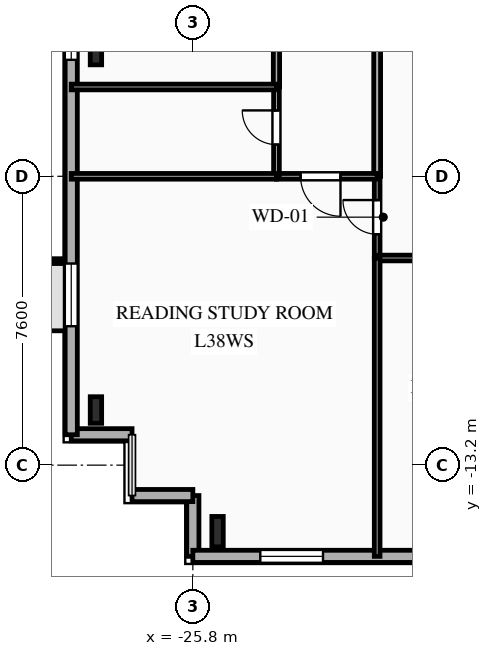
"""IFC4 building model, lengths in metres.
Left out: names, types, materials, properties, quantities, classifications, styles, units other than length and angle.
Written with IfcOpenShell. Run it as: python <this file> out.ifc"""

import sys

from ifc_helpers import new_model, si_unit, direction, frame, frame_2d, origin, origin_2d, place, context, subcontext, project, spatial, rectangle, i_section, extrude, element, fill, save


model = new_model("IFC4")
c1 = context("Model", 3, precision=1e-05, world=origin(), true_north=direction((0.0, 1.0)))
c2 = subcontext(c1, "Body", "Model", "MODEL_VIEW")
j1 = project(units=[si_unit("LENGTHUNIT", "METRE"), si_unit("PLANEANGLEUNIT", "RADIAN")], contexts=[c1])
p1 = place(None, origin())
s1 = spatial("IfcSite", under=j1, at=p1, CompositionType="ELEMENT")
p2 = place(p1, origin())
s2 = spatial("IfcBuilding", under=s1, at=p2, CompositionType="ELEMENT")
p3 = place(p2, frame((0.0, 0.0, 137.7)))
s3 = spatial("IfcBuildingStorey", under=s2, at=p3, CompositionType="ELEMENT", Elevation=137.7)
p4 = place(p3, frame((-25.15, -14.95, 0.0), z_axis=(0.0, 0.0, 1.0), x_axis=(1.0, 0.0, 0.0)))
e1 = element("IfcColumn", 1, at=p4, inside=s3, PredefinedType="COLUMN", context=c2, shape_type="SweptSolid", body=[
    extrude(i_section(OverallWidth=0.3, OverallDepth=0.8, WebThickness=0.018, FlangeThickness=0.033, FilletRadius=0.03, at=origin_2d()), origin(), (0.0, 0.0, 1.0), 3.35),
])
for number, where, z_axis, x_axis in (
    (2, (-28.35, -2.317, 0.0), (0.0, 0.0, 1.0), (1.0, 0.0, 0.0)),
    (3, (-28.35, -11.75, 0.0), (0.0, 0.0, 1.0), (1.0, 0.0, 0.0)),
):
    element("IfcColumn", number, at=place(p3, frame(where, z_axis=z_axis, x_axis=x_axis)), inside=s3, PredefinedType="COLUMN", context=c2, shape_type="SweptSolid", body=[
        extrude(i_section(OverallWidth=0.3, OverallDepth=0.7, WebThickness=0.017, FlangeThickness=0.032, FilletRadius=0.027, at=origin_2d()), origin(), (0.0, 0.0, 1.0), 3.35),
    ])
p5 = place(p3, frame((-25.8, -15.6, 0.0), z_axis=(0.0, 0.0, 1.0), x_axis=(0.0, 1.0, 0.0)))
e4 = element("IfcWall", 4, at=p5, inside=s3, PredefinedType="SOLIDWALL", context=c2, shape_type="SweptSolid", body=[
    extrude(rectangle(XDim=1.6, YDim=0.32, at=frame_2d((0.8, 0.0))), origin(), (0.0, 0.0, 1.0), 3.04),
])
p6 = place(p3, frame((-25.8, -14.0, 0.0), z_axis=(0.0, 0.0, 1.0), x_axis=(-1.0, 0.0, 0.0)))
e5 = element("IfcWall", 5, at=p6, inside=s3, PredefinedType="SOLIDWALL", context=c2, shape_type="SweptSolid", body=[
    extrude(rectangle(XDim=1.6, YDim=0.32, at=frame_2d((0.8, 0.0))), origin(), (0.0, 0.0, 1.0), 3.04),
])
p7 = place(p3, frame((-27.4, -12.4, 0.0), z_axis=(0.0, 0.0, 1.0), x_axis=(-1.0, 0.0, 0.0)))
e6 = element("IfcWall", 6, at=p7, inside=s3, PredefinedType="SOLIDWALL", context=c2, shape_type="SweptSolid", body=[
    extrude(rectangle(XDim=1.6, YDim=0.32, at=frame_2d((0.8, 0.0))), origin(), (0.0, 0.0, 1.0), 3.04),
])
p8 = place(p3, frame((-29.0, -12.4, 0.0), z_axis=(0.0, 0.0, 1.0), x_axis=(0.0, 1.0, 0.0)))
e7 = element("IfcWall", 7, at=p8, inside=s3, PredefinedType="SOLIDWALL", context=c2, shape_type="SweptSolid", body=[
    extrude(rectangle(XDim=29.6, YDim=0.32, at=frame_2d((14.8, 0.0))), origin(), (0.0, 0.0, 1.0), 3.04),
])
p9 = place(p8, frame((2.855, 0.0, 0.85)))
e8 = element("IfcOpeningElement", 8, at=p9, cuts=e7, PredefinedType="OPENING", context=c2, shape_type="SweptSolid", body=[
    extrude(rectangle(XDim=1.65, YDim=1.85, at=frame_2d((0.825, 0.925))), frame((0.0, 0.17, 0.0), z_axis=(0.0, -1.0, 0.0), x_axis=(1.0, 0.0, 0.0)), (0.0, 0.0, 1.0), 0.34),
])
p10 = place(p8, frame((9.865, 0.0, 0.85)))
e9 = element("IfcOpeningElement", 9, at=p10, cuts=e7, PredefinedType="OPENING", context=c2, shape_type="SweptSolid", body=[
    extrude(rectangle(XDim=1.95, YDim=1.85, at=frame_2d((0.975, 0.925))), frame((0.0, 0.17, 0.0), z_axis=(0.0, -1.0, 0.0), x_axis=(1.0, 0.0, 0.0)), (0.0, 0.0, 1.0), 0.34),
])
p11 = place(p8, frame((13.13, 0.0, 0.85)))
e10 = element("IfcOpeningElement", 10, at=p11, cuts=e7, PredefinedType="OPENING", context=c2, shape_type="SweptSolid", body=[
    extrude(rectangle(XDim=1.5, YDim=1.85, at=frame_2d((0.75, 0.925))), frame((0.0, 0.17, 0.0), z_axis=(0.0, -1.0, 0.0), x_axis=(1.0, 0.0, 0.0)), (0.0, 0.0, 1.0), 0.34),
])
p12 = place(p8, frame((15.93, 0.0, 0.85)))
e11 = element("IfcOpeningElement", 11, at=p12, cuts=e7, PredefinedType="OPENING", context=c2, shape_type="SweptSolid", body=[
    extrude(rectangle(XDim=1.5, YDim=1.85, at=frame_2d((0.75, 0.925))), frame((0.0, 0.17, 0.0), z_axis=(0.0, -1.0, 0.0), x_axis=(1.0, 0.0, 0.0)), (0.0, 0.0, 1.0), 0.34),
])
p13 = place(p8, frame((18.77, 0.0, 0.85)))
e12 = element("IfcOpeningElement", 12, at=p13, cuts=e7, PredefinedType="OPENING", context=c2, shape_type="SweptSolid", body=[
    extrude(rectangle(XDim=1.5, YDim=1.85, at=frame_2d((0.75, 0.925))), frame((0.0, 0.17, 0.0), z_axis=(0.0, -1.0, 0.0), x_axis=(1.0, 0.0, 0.0)), (0.0, 0.0, 1.0), 0.34),
])
p14 = place(p8, frame((24.255, 0.0, 0.85)))
e13 = element("IfcOpeningElement", 13, at=p14, cuts=e7, PredefinedType="OPENING", context=c2, shape_type="SweptSolid", body=[
    extrude(rectangle(XDim=1.65, YDim=1.85, at=frame_2d((0.825, 0.925))), frame((0.0, 0.17, 0.0), z_axis=(0.0, -1.0, 0.0), x_axis=(1.0, 0.0, 0.0)), (0.0, 0.0, 1.0), 0.34),
])
p15 = place(p3, frame((23.8, -15.6, 0.0), z_axis=(0.0, 0.0, 1.0), x_axis=(-1.0, 0.0, 0.0)))
e14 = element("IfcWall", 14, at=p15, inside=s3, PredefinedType="SOLIDWALL", context=c2, shape_type="SweptSolid", body=[
    extrude(rectangle(XDim=49.6, YDim=0.32, at=frame_2d((24.8, 0.0))), origin(), (0.0, 0.0, 1.0), 3.04),
])
p16 = place(p15, frame((1.13, 0.0, 0.85)))
e15 = element("IfcOpeningElement", 15, at=p16, cuts=e14, PredefinedType="OPENING", context=c2, shape_type="SweptSolid", body=[
    extrude(rectangle(XDim=1.1, YDim=1.85, at=frame_2d((0.55, 0.925))), frame((0.0, 0.17, 0.0), z_axis=(0.0, -1.0, 0.0), x_axis=(1.0, 0.0, 0.0)), (0.0, 0.0, 1.0), 0.34),
])
p17 = place(p15, frame((6.495, 0.0, 0.85)))
e16 = element("IfcOpeningElement", 16, at=p17, cuts=e14, PredefinedType="OPENING", context=c2, shape_type="SweptSolid", body=[
    extrude(rectangle(XDim=1.65, YDim=1.85, at=frame_2d((0.825, 0.925))), frame((0.0, 0.17, 0.0), z_axis=(0.0, -1.0, 0.0), x_axis=(1.0, 0.0, 0.0)), (0.0, 0.0, 1.0), 0.34),
])
p18 = place(p15, frame((13.996, 0.0, 0.85)))
e17 = element("IfcOpeningElement", 17, at=p18, cuts=e14, PredefinedType="OPENING", context=c2, shape_type="SweptSolid", body=[
    extrude(rectangle(XDim=2.2, YDim=1.85, at=frame_2d((1.1, 0.925))), frame((0.0, 0.17, 0.0), z_axis=(0.0, -1.0, 0.0), x_axis=(1.0, 0.0, 0.0)), (0.0, 0.0, 1.0), 0.34),
])
p19 = place(p15, frame((22.396, 0.0, 0.85)))
e18 = element("IfcOpeningElement", 18, at=p19, cuts=e14, PredefinedType="OPENING", context=c2, shape_type="SweptSolid", body=[
    extrude(rectangle(XDim=2.2, YDim=1.85, at=frame_2d((1.1, 0.925))), frame((0.0, 0.17, 0.0), z_axis=(0.0, -1.0, 0.0), x_axis=(1.0, 0.0, 0.0)), (0.0, 0.0, 1.0), 0.34),
])
p20 = place(p15, frame((30.2, 0.0, 0.85)))
e19 = element("IfcOpeningElement", 19, at=p20, cuts=e14, PredefinedType="OPENING", context=c2, shape_type="SweptSolid", body=[
    extrude(rectangle(XDim=2.2, YDim=1.85, at=frame_2d((1.1, 0.925))), frame((0.0, 0.17, 0.0), z_axis=(0.0, -1.0, 0.0), x_axis=(1.0, 0.0, 0.0)), (0.0, 0.0, 1.0), 0.34),
])
p21 = place(p15, frame((38.673, 0.0, 0.85)))
e20 = element("IfcOpeningElement", 20, at=p21, cuts=e14, PredefinedType="OPENING", context=c2, shape_type="SweptSolid", body=[
    extrude(rectangle(XDim=1.65, YDim=1.85, at=frame_2d((0.825, 0.925))), frame((0.0, 0.17, 0.0), z_axis=(0.0, -1.0, 0.0), x_axis=(1.0, 0.0, 0.0)), (0.0, 0.0, 1.0), 0.34),
])
p22 = place(p15, frame((46.175, 0.0, 0.85)))
e21 = element("IfcOpeningElement", 21, at=p22, cuts=e14, PredefinedType="OPENING", context=c2, shape_type="SweptSolid", body=[
    extrude(rectangle(XDim=1.65, YDim=1.85, at=frame_2d((0.825, 0.925))), frame((0.0, 0.17, 0.0), z_axis=(0.0, -1.0, 0.0), x_axis=(1.0, 0.0, 0.0)), (0.0, 0.0, 1.0), 0.34),
])
p23 = place(p3, frame((-20.95, -7.75, 0.0), z_axis=(0.0, 0.0, 1.0), x_axis=(0.0, 1.0, 0.0)))
e22 = element("IfcWall", 22, at=p23, inside=s3, PredefinedType="PARTITIONING", context=c2, shape_type="SweptSolid", body=[
    extrude(rectangle(XDim=2.15, YDim=0.15, at=frame_2d((1.075, 0.0))), origin(), (0.0, 0.0, 1.0), 3.04),
])
p24 = place(p23, frame((0.625, 0.0, 0.0)))
e23 = element("IfcOpeningElement", 23, at=p24, cuts=e22, PredefinedType="OPENING", context=c2, shape_type="SweptSolid", body=[
    extrude(rectangle(XDim=0.9, YDim=2.1, at=frame_2d((0.45, 1.05))), frame((0.0, 0.085, 0.0), z_axis=(0.0, -1.0, 0.0), x_axis=(1.0, 0.0, 0.0)), (0.0, 0.0, 1.0), 0.17),
])
p25 = place(p3, frame((-13.07, -7.75, 0.0), z_axis=(0.0, 0.0, 1.0), x_axis=(-1.0, 0.0, 0.0)))
e24 = element("IfcWall", 24, at=p25, inside=s3, PredefinedType="PARTITIONING", context=c2, shape_type="SweptSolid", body=[
    extrude(rectangle(XDim=7.88, YDim=0.15, at=frame_2d((3.94, 0.0))), origin(), (0.0, 0.0, 1.0), 3.04),
])
p26 = place(p25, frame((1.289, 0.0, 0.0)))
e25 = element("IfcOpeningElement", 25, at=p26, cuts=e24, PredefinedType="OPENING", context=c2, shape_type="SweptSolid", body=[
    extrude(rectangle(XDim=1.05, YDim=2.15, at=frame_2d((0.525, 1.075))), frame((0.0, 0.085, 0.0), z_axis=(0.0, -1.0, 0.0), x_axis=(1.0, 0.0, 0.0)), (0.0, 0.0, 1.0), 0.17),
])
p27 = place(p3, frame((-20.95, -5.6, 0.0), z_axis=(0.0, 0.0, 1.0), x_axis=(0.0, 1.0, 0.0)))
e26 = element("IfcWall", 26, at=p27, inside=s3, PredefinedType="PARTITIONING", context=c2, shape_type="SweptSolid", body=[
    extrude(rectangle(XDim=14.1, YDim=0.18, at=frame_2d((7.05, 0.0))), origin(), (0.0, 0.0, 1.0), 3.04),
])
p28 = place(p27, frame((5.058, 0.0, 0.0)))
e27 = element("IfcOpeningElement", 27, at=p28, cuts=e26, PredefinedType="OPENING", context=c2, shape_type="SweptSolid", body=[
    extrude(rectangle(XDim=1.0, YDim=2.15, at=frame_2d((0.5, 1.075))), frame((0.0, 0.1, 0.0), z_axis=(0.0, -1.0, 0.0), x_axis=(1.0, 0.0, 0.0)), (0.0, 0.0, 1.0), 0.2),
])
p29 = place(p3, frame((-20.95, -5.6, 0.0), z_axis=(0.0, 0.0, 1.0), x_axis=(-1.0, 0.0, 0.0)))
e28 = element("IfcWall", 28, at=p29, inside=s3, PredefinedType="PARTITIONING", context=c2, shape_type="SweptSolid", body=[
    extrude(rectangle(XDim=2.65, YDim=0.15, at=frame_2d((1.325, 0.0))), origin(), (0.0, 0.0, 1.0), 3.04),
])
p30 = place(p29, frame((0.965, 0.0, 0.0)))
e29 = element("IfcOpeningElement", 29, at=p30, cuts=e28, PredefinedType="OPENING", context=c2, shape_type="SweptSolid", body=[
    extrude(rectangle(XDim=1.05, YDim=2.15, at=frame_2d((0.525, 1.075))), frame((0.0, 0.085, 0.0), z_axis=(0.0, -1.0, 0.0), x_axis=(1.0, 0.0, 0.0)), (0.0, 0.0, 1.0), 0.17),
])
p31 = place(p3, frame((-23.6, -5.6, 0.0), z_axis=(0.0, 0.0, 1.0), x_axis=(0.0, 1.0, 0.0)))
e30 = element("IfcWall", 30, at=p31, inside=s3, PredefinedType="PLUMBINGWALL", context=c2, shape_type="SweptSolid", body=[
    extrude(rectangle(XDim=2.35, YDim=0.15, at=frame_2d((1.175, 0.0))), origin(), (0.0, 0.0, 1.0), 2.695),
])
p32 = place(p31, frame((0.834, 0.0, 0.0)))
e31 = element("IfcOpeningElement", 31, at=p32, cuts=e30, PredefinedType="OPENING", context=c2, shape_type="SweptSolid", body=[
    extrude(rectangle(XDim=0.9, YDim=2.1, at=frame_2d((0.45, 1.05))), frame((0.0, 0.085, 0.0), z_axis=(0.0, -1.0, 0.0), x_axis=(1.0, 0.0, 0.0)), (0.0, 0.0, 1.0), 0.17),
])
p33 = place(p3, frame((-23.6, -3.25, 0.0), z_axis=(0.0, 0.0, 1.0), x_axis=(0.0, 1.0, 0.0)))
e32 = element("IfcWall", 32, at=p33, inside=s3, PredefinedType="PARTITIONING", context=c2, shape_type="SweptSolid", body=[
    extrude(rectangle(XDim=3.29, YDim=0.165, at=frame_2d((1.645, 0.0))), origin(), (0.0, 0.0, 1.0), 2.695),
])
p34 = place(p33, frame((1.438, 0.0, 0.0)))
e33 = element("IfcOpeningElement", 33, at=p34, cuts=e32, PredefinedType="OPENING", context=c2, shape_type="SweptSolid", body=[
    extrude(rectangle(XDim=1.15, YDim=2.15, at=frame_2d((0.575, 1.075))), frame((0.0, 0.093, 0.0), z_axis=(0.0, -1.0, 0.0), x_axis=(1.0, 0.0, 0.0)), (0.0, 0.0, 1.0), 0.185),
])
p35 = place(p3, frame((-29.0, -5.6, 0.0), z_axis=(0.0, 0.0, 1.0), x_axis=(1.0, 0.0, 0.0)))
e34 = element("IfcWall", 34, at=p35, inside=s3, PredefinedType="PLUMBINGWALL", context=c2, shape_type="SweptSolid", body=[
    extrude(rectangle(XDim=5.4, YDim=0.15, at=frame_2d((2.7, 0.0))), origin(), (0.0, 0.0, 1.0), 3.04),
])
p36 = place(p3, frame((-20.95, -7.75, 0.0), z_axis=(0.0, 0.0, 1.0), x_axis=(0.0, -1.0, 0.0)))
e35 = element("IfcWall", 35, at=p36, inside=s3, PredefinedType="PARTITIONING", context=c2, shape_type="SweptSolid", body=[
    extrude(rectangle(XDim=7.85, YDim=0.15, at=frame_2d((3.925, 0.0))), origin(), (0.0, 0.0, 1.0), 3.04),
])
p37 = place(p3, frame((-29.0, -3.25, 0.0), z_axis=(0.0, 0.0, 1.0), x_axis=(1.0, 0.0, 0.0)))
e36 = element("IfcWall", 36, at=p37, inside=s3, PredefinedType="PLUMBINGWALL", context=c2, shape_type="SweptSolid", body=[
    extrude(rectangle(XDim=5.4, YDim=0.15, at=frame_2d((2.7, 0.0))), origin(), (0.0, 0.0, 1.0), 3.04),
])
p38 = place(p9, origin())
e37 = element("IfcWindow", 37, at=p38, inside=s3, PartitioningType="SINGLE_PANEL", PredefinedType="WINDOW", context=c2, shape_type="SweptSolid", body=[
    extrude(rectangle(XDim=1.65, YDim=1.85, at=frame_2d((0.825, 0.925))), frame((0.0, 0.03, 0.0), z_axis=(0.0, -1.0, 0.0), x_axis=(1.0, 0.0, 0.0)), (0.0, 0.0, 1.0), 0.06),
])
fill(e8, e37)
p39 = place(p10, origin())
e38 = element("IfcWindow", 38, at=p39, inside=s3, PartitioningType="SINGLE_PANEL", PredefinedType="WINDOW", context=c2, shape_type="SweptSolid", body=[
    extrude(rectangle(XDim=1.95, YDim=1.85, at=frame_2d((0.975, 0.925))), frame((0.0, 0.03, 0.0), z_axis=(0.0, -1.0, 0.0), x_axis=(1.0, 0.0, 0.0)), (0.0, 0.0, 1.0), 0.06),
])
fill(e9, e38)
p40 = place(p22, origin())
e39 = element("IfcWindow", 39, at=p40, inside=s3, PartitioningType="SINGLE_PANEL", PredefinedType="WINDOW", context=c2, shape_type="SweptSolid", body=[
    extrude(rectangle(XDim=1.65, YDim=1.85, at=frame_2d((0.825, 0.925))), frame((0.0, 0.03, 0.0), z_axis=(0.0, -1.0, 0.0), x_axis=(1.0, 0.0, 0.0)), (0.0, 0.0, 1.0), 0.06),
])
fill(e21, e39)
p41 = place(p24, origin())
e40 = element("IfcDoor", 40, at=p41, inside=s3, OperationType="SINGLE_SWING_RIGHT", PredefinedType="DOOR", context=c2, shape_type="SweptSolid", body=[
    extrude(rectangle(XDim=0.9, YDim=2.1, at=frame_2d((0.45, 1.05))), frame((0.0, 0.025, 0.0), z_axis=(0.0, -1.0, 0.0), x_axis=(1.0, 0.0, 0.0)), (0.0, 0.0, 1.0), 0.05),
])
fill(e23, e40)
p42 = place(p30, origin())
e41 = element("IfcDoor", 41, at=p42, inside=s3, OperationType="SINGLE_SWING_LEFT", PredefinedType="DOOR", context=c2, shape_type="SweptSolid", body=[
    extrude(rectangle(XDim=1.05, YDim=2.15, at=frame_2d((0.525, 1.075))), frame((0.0, 0.025, 0.0), z_axis=(0.0, -1.0, 0.0), x_axis=(1.0, 0.0, 0.0)), (0.0, 0.0, 1.0), 0.05),
])
fill(e29, e41)
p43 = place(p32, origin())
e42 = element("IfcDoor", 42, at=p43, inside=s3, OperationType="SINGLE_SWING_RIGHT", PredefinedType="DOOR", context=c2, shape_type="SweptSolid", body=[
    extrude(rectangle(XDim=0.9, YDim=2.1, at=frame_2d((0.45, 1.05))), frame((0.0, 0.025, 0.0), z_axis=(0.0, -1.0, 0.0), x_axis=(1.0, 0.0, 0.0)), (0.0, 0.0, 1.0), 0.05),
])
fill(e31, e42)
save(model, sys.argv[1])
